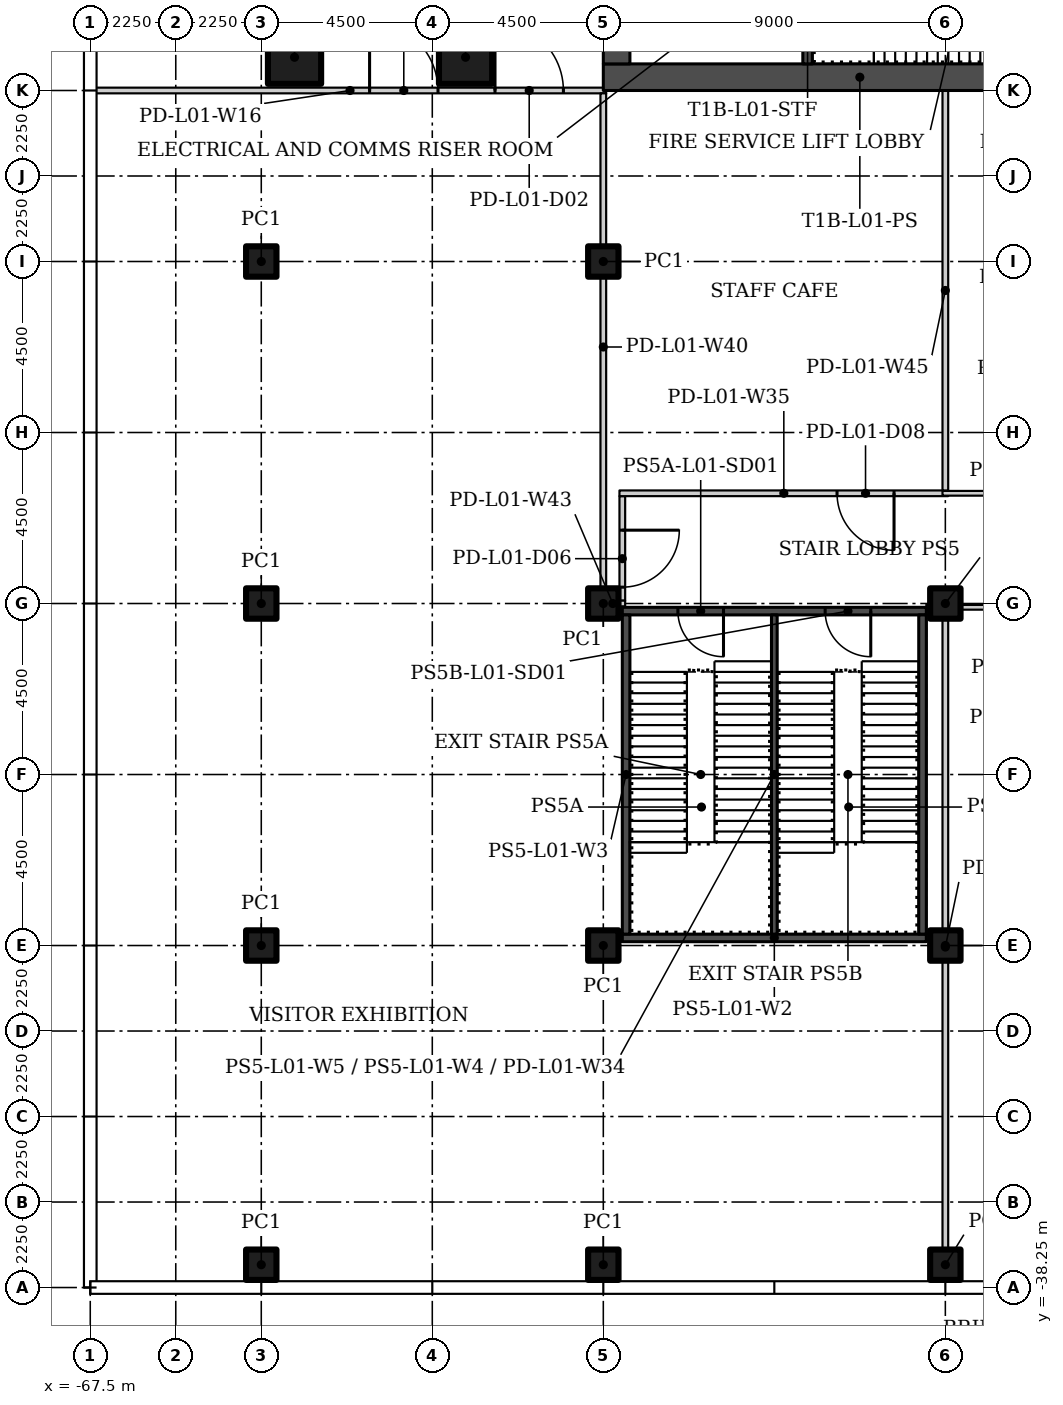
"""IFC4 building model, lengths in metres.
Left out: names, types, materials, properties, quantities, classifications, styles, units other than length and angle.
Written with IfcOpenShell. Run it as: python <this file> out.ifc"""

import sys

from ifc_helpers import new_model, si_unit, direction, frame, frame_2d, origin, origin_2d, place, context, subcontext, project, spatial, rectangle, hollow_rectangle, extrude, element, fill, save


model = new_model("IFC4")
c1 = context("Model", 3, precision=1e-05, world=origin(), true_north=direction((0.0, 1.0)))
c2 = subcontext(c1, "Body", "Model", "MODEL_VIEW")
j1 = project(units=[si_unit("LENGTHUNIT", "METRE"), si_unit("PLANEANGLEUNIT", "RADIAN")], contexts=[c1])
p1 = place(None, origin())
s1 = spatial("IfcSite", under=j1, at=p1, CompositionType="ELEMENT")
p2 = place(p1, origin())
s2 = spatial("IfcBuilding", under=s1, at=p2, CompositionType="ELEMENT")
p3 = place(p2, frame((0.0, 0.0, 6.5)))
s3 = spatial("IfcBuildingStorey", under=s2, at=p3, CompositionType="ELEMENT", Elevation=6.5)
for number, where in (
    (1, (-57.625, -5.875, 0.0)),
    (2, (-62.125, -5.875, 0.0)),
):
    element("IfcColumn", number, at=place(p3, frame(where)), inside=s3, PredefinedType="COLUMN", context=c2, shape_type="SweptSolid", body=[
        extrude(hollow_rectangle(XDim=1.4, YDim=1.4, WallThickness=0.06, at=origin_2d()), origin(), (0.0, 0.0, 1.0), 5.6),
    ])
for number, where in (
    (3, (-63.0, -37.65, 0.0)),
    (4, (-63.0, -29.25, 0.0)),
    (5, (-63.0, -20.25, 0.0)),
    (6, (-63.0, -11.25, 0.0)),
    (7, (-54.0, -37.65, 0.0)),
    (8, (-54.0, -29.25, 0.0)),
    (9, (-54.0, -20.25, 0.0)),
    (10, (-54.0, -11.25, 0.0)),
    (11, (-45.0, -37.65, 0.0)),
    (12, (-45.0, -29.25, 0.0)),
    (13, (-45.0, -20.25, 0.0)),
):
    element("IfcColumn", number, at=place(p3, frame(where)), inside=s3, PredefinedType="COLUMN", context=c2, shape_type="SweptSolid", body=[
        extrude(hollow_rectangle(XDim=0.8, YDim=0.8, WallThickness=0.03, at=origin_2d()), origin(), (0.0, 0.0, 1.0), 5.6),
    ])
p4 = place(p3, frame((-67.405, -6.75, 0.0)))
e14 = element("IfcWall", 14, at=p4, inside=s3, PredefinedType="PARTITIONING", context=c2, shape_type="SweptSolid", body=[
    extrude(rectangle(XDim=13.48, YDim=0.15, at=frame_2d((6.74, 0.0))), origin(), (0.0, 0.0, 1.0), 5.6),
])
p5 = place(p4, frame((7.255, 0.0, 0.0)))
e15 = element("IfcOpeningElement", 15, at=p5, cuts=e14, PredefinedType="OPENING", context=c2, shape_type="SweptSolid", body=[
    extrude(rectangle(XDim=1.8, YDim=2.4, at=frame_2d((0.9, 1.2))), frame((0.0, 0.085, 0.0), z_axis=(0.0, -1.0, 0.0), x_axis=(1.0, 0.0, 0.0)), (0.0, 0.0, 1.0), 0.17),
])
p6 = place(p4, frame((10.555, 0.0, 0.0)))
e16 = element("IfcOpeningElement", 16, at=p6, cuts=e14, PredefinedType="OPENING", context=c2, shape_type="SweptSolid", body=[
    extrude(rectangle(XDim=1.8, YDim=2.4, at=frame_2d((0.9, 1.2))), frame((0.0, 0.085, 0.0), z_axis=(0.0, -1.0, 0.0), x_axis=(1.0, 0.0, 0.0)), (0.0, 0.0, 1.0), 0.17),
])
p7 = place(p3, frame((-45.5, -20.35, 0.0)))
e17 = element("IfcWall", 17, at=p7, inside=s3, PredefinedType="PARTITIONING", context=c2, shape_type="SweptSolid", body=[
    extrude(rectangle(XDim=0.575, YDim=0.15, at=frame_2d((0.288, 0.0))), origin(), (0.0, 0.0, 1.0), 5.6),
])
p8 = place(p3, frame((-53.5, -17.425, 0.0), z_axis=(0.0, 0.0, 1.0), x_axis=(0.0, -1.0, 0.0)))
e18 = element("IfcWall", 18, at=p8, inside=s3, PredefinedType="PARTITIONING", context=c2, shape_type="SweptSolid", body=[
    extrude(rectangle(XDim=2.75, YDim=0.15, at=frame_2d((1.375, 0.0))), origin(), (0.0, 0.0, 1.0), 5.6),
])
p9 = place(p8, frame((0.895, 0.0, 0.0)))
e19 = element("IfcOpeningElement", 19, at=p9, cuts=e18, PredefinedType="OPENING", context=c2, shape_type="SweptSolid", body=[
    extrude(rectangle(XDim=1.5, YDim=2.1, at=frame_2d((0.75, 1.05))), frame((0.0, 0.085, 0.0), z_axis=(0.0, -1.0, 0.0), x_axis=(1.0, 0.0, 0.0)), (0.0, 0.0, 1.0), 0.17),
])
p10 = place(p3, frame((-44.925, -17.35, 0.0), z_axis=(0.0, 0.0, 1.0), x_axis=(-1.0, 0.0, 0.0)))
e20 = element("IfcWall", 20, at=p10, inside=s3, PredefinedType="PARTITIONING", context=c2, shape_type="SweptSolid", body=[
    extrude(rectangle(XDim=8.65, YDim=0.15, at=frame_2d((4.325, 0.0))), origin(), (0.0, 0.0, 1.0), 5.6),
])
p11 = place(p10, frame((1.425, 0.0, 0.0)))
e21 = element("IfcOpeningElement", 21, at=p11, cuts=e20, PredefinedType="OPENING", context=c2, shape_type="SweptSolid", body=[
    extrude(rectangle(XDim=1.5, YDim=2.1, at=frame_2d((0.75, 1.05))), frame((0.0, 0.085, 0.0), z_axis=(0.0, -1.0, 0.0), x_axis=(1.0, 0.0, 0.0)), (0.0, 0.0, 1.0), 0.17),
])
p12 = place(p3, frame((-45.075, -20.35, 0.0)))
e22 = element("IfcWall", 22, at=p12, inside=s3, PredefinedType="PARTITIONING", context=c2, shape_type="SweptSolid", body=[
    extrude(rectangle(XDim=4.637, YDim=0.125, at=frame_2d((2.319, 0.0))), origin(), (0.0, 0.0, 1.0), 5.6),
])
p13 = place(p12, frame((1.875, 0.0, 0.0)))
e23 = element("IfcOpeningElement", 23, at=p13, cuts=e22, PredefinedType="OPENING", context=c2, shape_type="SweptSolid", body=[
    extrude(rectangle(XDim=0.9, YDim=2.1, at=frame_2d((0.45, 1.05))), frame((0.0, 0.073, 0.0), z_axis=(0.0, -1.0, 0.0), x_axis=(1.0, 0.0, 0.0)), (0.0, 0.0, 1.0), 0.145),
])
p14 = place(p3, frame((-45.075, -17.35, 0.0)))
e24 = element("IfcWall", 24, at=p14, inside=s3, PredefinedType="PARTITIONING", context=c2, shape_type="SweptSolid", body=[
    extrude(rectangle(XDim=4.637, YDim=0.125, at=frame_2d((2.319, 0.0))), origin(), (0.0, 0.0, 1.0), 5.6),
])
p15 = place(p3, frame((-54.0, -20.175, 0.0), z_axis=(0.0, 0.0, 1.0), x_axis=(0.0, 1.0, 0.0)))
e25 = element("IfcWall", 25, at=p15, inside=s3, PredefinedType="PARTITIONING", context=c2, shape_type="SweptSolid", body=[
    extrude(rectangle(XDim=13.35, YDim=0.15, at=frame_2d((6.675, 0.0))), origin(), (0.0, 0.0, 1.0), 5.6),
])
p16 = place(p3, frame((-53.425, -20.25, 0.0), z_axis=(0.0, 0.0, 1.0), x_axis=(-1.0, 0.0, 0.0)))
e26 = element("IfcWall", 26, at=p16, inside=s3, PredefinedType="PARTITIONING", context=c2, shape_type="SweptSolid", body=[
    extrude(rectangle(XDim=0.65, YDim=0.15, at=frame_2d((0.325, 0.0))), origin(), (0.0, 0.0, 1.0), 5.6),
])
p17 = place(p3, frame((-45.0, -38.155, 0.0), z_axis=(0.0, 0.0, 1.0), x_axis=(0.0, 1.0, 0.0)))
e27 = element("IfcWall", 27, at=p17, inside=s3, PredefinedType="PARTITIONING", context=c2, shape_type="SweptSolid", body=[
    extrude(rectangle(XDim=17.73, YDim=0.15, at=frame_2d((8.865, 0.0))), origin(), (0.0, 0.0, 1.0), 5.6),
])
p18 = place(p3, frame((-45.0, -17.275, 0.0), z_axis=(0.0, 0.0, 1.0), x_axis=(0.0, 1.0, 0.0)))
e28 = element("IfcWall", 28, at=p18, inside=s3, PredefinedType="PARTITIONING", context=c2, shape_type="SweptSolid", body=[
    extrude(rectangle(XDim=10.525, YDim=0.15, at=frame_2d((5.262, 0.0))), origin(), (0.0, 0.0, 1.0), 5.6),
])
p19 = place(p3, frame((-40.5, -6.4, 0.0), z_axis=(0.0, 0.0, 1.0), x_axis=(-1.0, 0.0, 0.0)))
e29 = element("IfcWall", 29, at=p19, inside=s3, PredefinedType="SHEAR", context=c2, shape_type="SweptSolid", body=[
    extrude(rectangle(XDim=13.5, YDim=0.7, at=frame_2d((6.75, 0.0))), origin(), (0.0, 0.0, 1.0), 5.6),
])
p20 = place(p3, frame((-53.65, -6.05, 0.0), z_axis=(0.0, 0.0, 1.0), x_axis=(0.0, 1.0, 0.0)))
e30 = element("IfcWall", 30, at=p20, inside=s3, PredefinedType="SHEAR", context=c2, shape_type="SweptSolid", body=[
    extrude(rectangle(XDim=12.1, YDim=0.7, at=frame_2d((6.05, 0.0))), origin(), (0.0, 0.0, 1.0), 5.6),
])
p21 = place(p20, frame((0.8, 0.0, 0.0)))
e31 = element("IfcOpeningElement", 31, at=p21, cuts=e30, PredefinedType="OPENING", context=c2, shape_type="SweptSolid", body=[
    extrude(rectangle(XDim=1.2, YDim=2.1, at=frame_2d((0.6, 1.05))), frame((0.0, 0.36, 0.0), z_axis=(0.0, -1.0, 0.0), x_axis=(1.0, 0.0, 0.0)), (0.0, 0.0, 1.0), 0.72),
])
p22 = place(p20, frame((6.4, 0.0, 0.0)))
e32 = element("IfcOpeningElement", 32, at=p22, cuts=e30, PredefinedType="OPENING", context=c2, shape_type="SweptSolid", body=[
    extrude(rectangle(XDim=1.8, YDim=2.4, at=frame_2d((0.9, 1.2))), frame((0.0, 0.36, 0.0), z_axis=(0.0, -1.0, 0.0), x_axis=(1.0, 0.0, 0.0)), (0.0, 0.0, 1.0), 0.72),
])
p23 = place(p3, frame((-48.625, -6.05, 0.0), z_axis=(0.0, 0.0, 1.0), x_axis=(0.0, 1.0, 0.0)))
e33 = element("IfcWall", 33, at=p23, inside=s3, PredefinedType="SHEAR", context=c2, shape_type="SweptSolid", body=[
    extrude(rectangle(XDim=2.55, YDim=0.25, at=frame_2d((1.275, 0.0))), origin(), (0.0, 0.0, 1.0), 5.6),
])
p24 = place(p3, frame((-45.5, -20.45, 0.0), z_axis=(0.0, 0.0, 1.0), x_axis=(-1.0, 0.0, 0.0)))
e34 = element("IfcWall", 34, at=p24, inside=s3, PredefinedType="SHEAR", context=c2, shape_type="SweptSolid", body=[
    extrude(rectangle(XDim=8.0, YDim=0.2, at=frame_2d((4.0, 0.0))), origin(), (0.0, 0.0, 1.0), 5.6),
])
p25 = place(p24, frame((5.337, 0.0, 0.0)))
e35 = element("IfcOpeningElement", 35, at=p25, cuts=e34, PredefinedType="OPENING", context=c2, shape_type="SweptSolid", body=[
    extrude(rectangle(XDim=1.2, YDim=2.4, at=frame_2d((0.6, 1.2))), frame((0.0, 0.11, 0.0), z_axis=(0.0, -1.0, 0.0), x_axis=(1.0, 0.0, 0.0)), (0.0, 0.0, 1.0), 0.22),
])
p26 = place(p24, frame((1.462, 0.0, 0.0)))
e36 = element("IfcOpeningElement", 36, at=p26, cuts=e34, PredefinedType="OPENING", context=c2, shape_type="SweptSolid", body=[
    extrude(rectangle(XDim=1.2, YDim=2.4, at=frame_2d((0.6, 1.2))), frame((0.0, 0.11, 0.0), z_axis=(0.0, -1.0, 0.0), x_axis=(1.0, 0.0, 0.0)), (0.0, 0.0, 1.0), 0.22),
])
p27 = place(p3, frame((-53.5, -29.05, 0.0)))
e37 = element("IfcWall", 37, at=p27, inside=s3, PredefinedType="SHEAR", context=c2, shape_type="SweptSolid", body=[
    extrude(rectangle(XDim=8.0, YDim=0.2, at=frame_2d((4.0, 0.0))), origin(), (0.0, 0.0, 1.0), 5.6),
])
for number, where, z_axis, x_axis in (
    (38, (-53.4, -28.95, 0.0), (0.0, 0.0, 1.0), (0.0, 1.0, 0.0)),
    (39, (-45.6, -28.95, 0.0), (0.0, 0.0, 1.0), (0.0, 1.0, 0.0)),
):
    element("IfcWall", number, at=place(p3, frame(where, z_axis=z_axis, x_axis=x_axis)), inside=s3, PredefinedType="SHEAR", context=c2, shape_type="SweptSolid", body=[
        extrude(rectangle(XDim=8.4, YDim=0.2, at=frame_2d((4.2, 0.0))), origin(), (0.0, 0.0, 1.0), 5.6),
    ])
p28 = place(p3, frame((-49.5, -28.95, 0.0), z_axis=(0.0, 0.0, 1.0), x_axis=(0.0, 1.0, 0.0)))
e40 = element("IfcWall", 40, at=p28, inside=s3, PredefinedType="SHEAR", context=c2, shape_type="SweptSolid", body=[
    extrude(rectangle(XDim=8.4, YDim=0.15, at=frame_2d((4.2, 0.0))), origin(), (0.0, 0.0, 1.0), 5.6),
])
p29 = place(p5, origin())
e41 = element("IfcDoor", 41, at=p29, inside=s3, OperationType="DOUBLE_DOOR_SINGLE_SWING", PredefinedType="DOOR", context=c2, shape_type="SweptSolid", body=[
    extrude(rectangle(XDim=1.8, YDim=2.4, at=frame_2d((0.9, 1.2))), frame((0.0, 0.025, 0.0), z_axis=(0.0, -1.0, 0.0), x_axis=(1.0, 0.0, 0.0)), (0.0, 0.0, 1.0), 0.05),
])
fill(e15, e41)
p30 = place(p6, origin())
e42 = element("IfcDoor", 42, at=p30, inside=s3, OperationType="DOUBLE_DOOR_SINGLE_SWING", PredefinedType="DOOR", context=c2, shape_type="SweptSolid", body=[
    extrude(rectangle(XDim=1.8, YDim=2.4, at=frame_2d((0.9, 1.2))), frame((0.0, 0.025, 0.0), z_axis=(0.0, -1.0, 0.0), x_axis=(1.0, 0.0, 0.0)), (0.0, 0.0, 1.0), 0.05),
])
fill(e16, e42)
p31 = place(p9, origin())
e43 = element("IfcDoor", 43, at=p31, inside=s3, OperationType="DOUBLE_DOOR_SINGLE_SWING", PredefinedType="DOOR", context=c2, shape_type="SweptSolid", body=[
    extrude(rectangle(XDim=1.5, YDim=2.1, at=frame_2d((0.75, 1.05))), frame((0.0, 0.025, 0.0), z_axis=(0.0, -1.0, 0.0), x_axis=(1.0, 0.0, 0.0)), (0.0, 0.0, 1.0), 0.05),
])
fill(e19, e43)
p32 = place(p11, origin())
e44 = element("IfcDoor", 44, at=p32, inside=s3, OperationType="DOUBLE_DOOR_SINGLE_SWING", PredefinedType="DOOR", context=c2, shape_type="SweptSolid", body=[
    extrude(rectangle(XDim=1.5, YDim=2.1, at=frame_2d((0.75, 1.05))), frame((0.0, 0.025, 0.0), z_axis=(0.0, -1.0, 0.0), x_axis=(1.0, 0.0, 0.0)), (0.0, 0.0, 1.0), 0.05),
])
fill(e21, e44)
p33 = place(p25, origin())
e45 = element("IfcDoor", 45, at=p33, inside=s3, OperationType="SINGLE_SWING_LEFT", PredefinedType="DOOR", context=c2, shape_type="SweptSolid", body=[
    extrude(rectangle(XDim=1.2, YDim=2.4, at=frame_2d((0.6, 1.2))), frame((0.0, 0.025, 0.0), z_axis=(0.0, -1.0, 0.0), x_axis=(1.0, 0.0, 0.0)), (0.0, 0.0, 1.0), 0.05),
])
fill(e35, e45)
p34 = place(p26, origin())
e46 = element("IfcDoor", 46, at=p34, inside=s3, OperationType="SINGLE_SWING_RIGHT", PredefinedType="DOOR", context=c2, shape_type="SweptSolid", body=[
    extrude(rectangle(XDim=1.2, YDim=2.4, at=frame_2d((0.6, 1.2))), frame((0.0, 0.025, 0.0), z_axis=(0.0, -1.0, 0.0), x_axis=(1.0, 0.0, 0.0)), (0.0, 0.0, 1.0), 0.05),
])
fill(e36, e46)
save(model, sys.argv[1])
